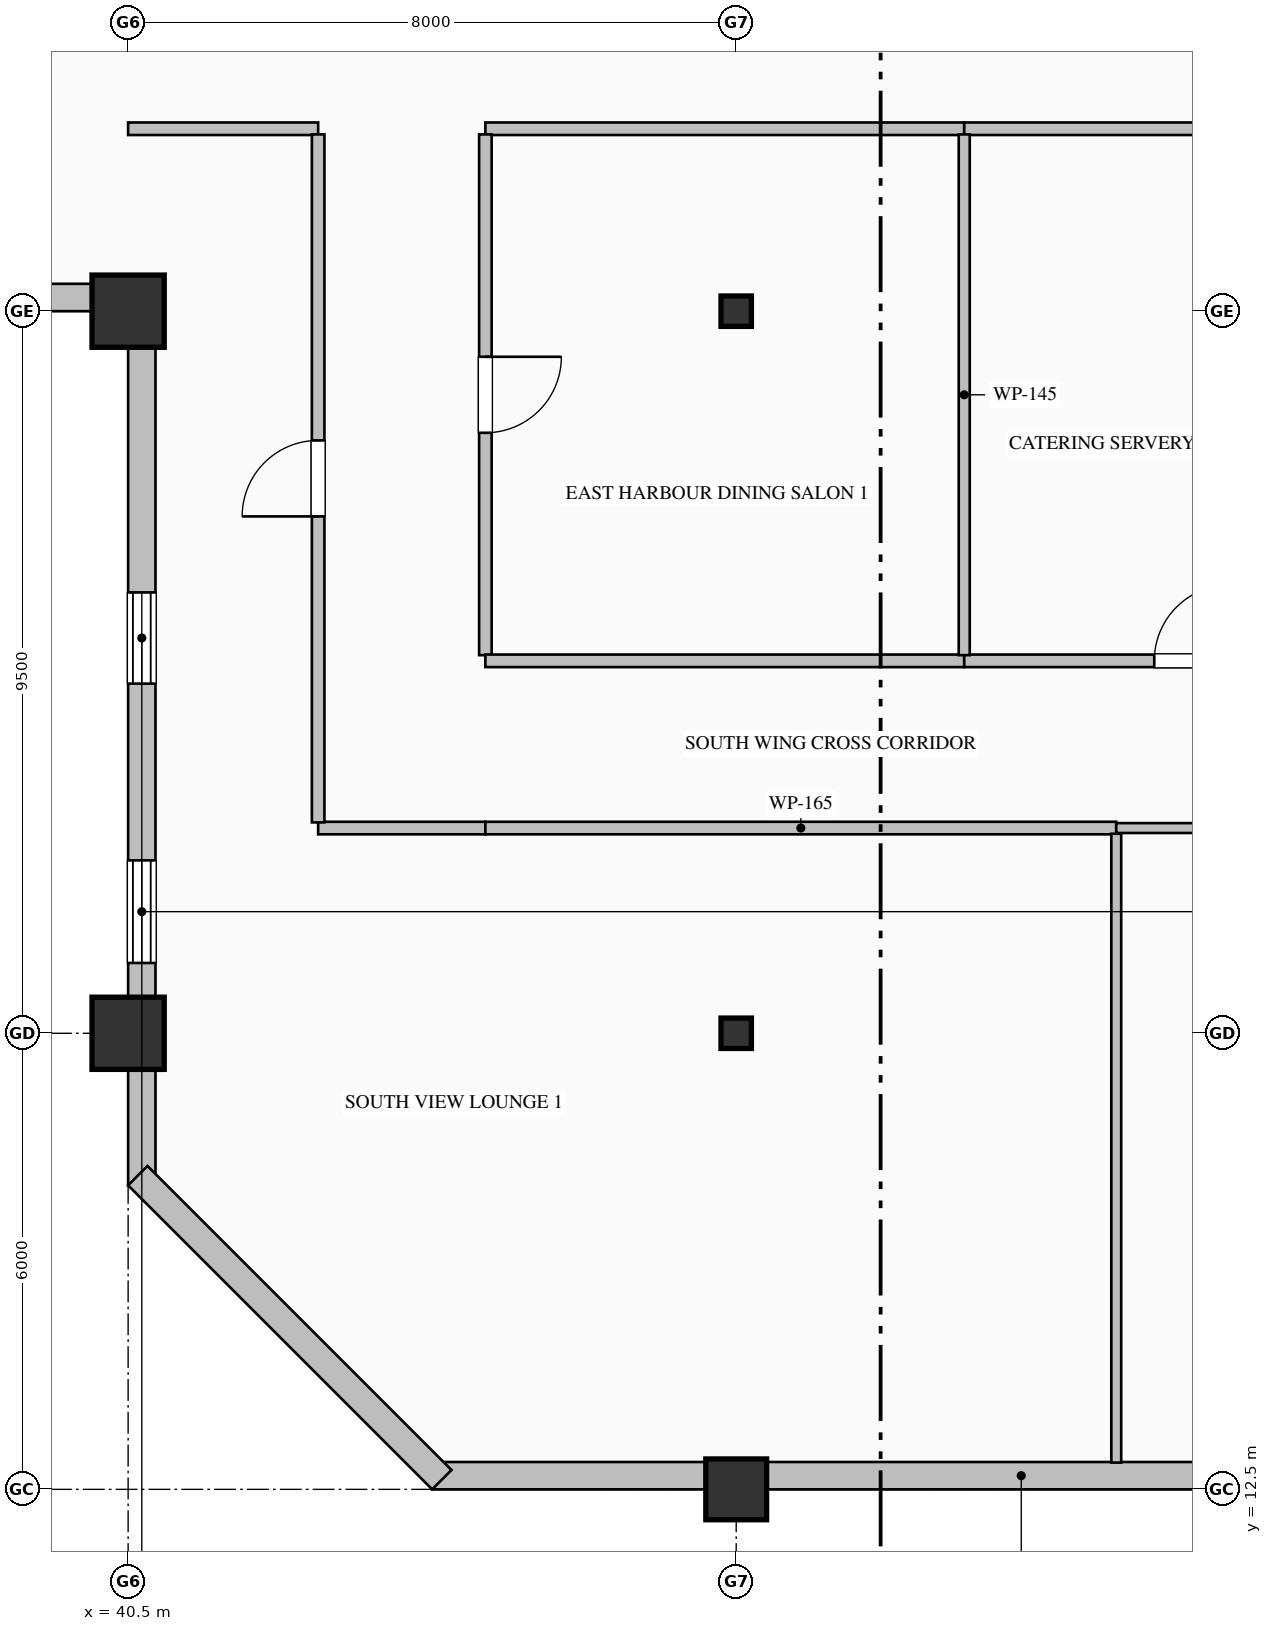
"""IFC4 building model, lengths in metres.
Left out: names, types, materials, properties, quantities, classifications, styles, units other than length and angle.
Written with IfcOpenShell. Run it as: python <this file> out.ifc"""

import sys

from ifc_helpers import new_model, si_unit, direction, frame, frame_2d, origin, origin_2d, place, context, subcontext, project, spatial, rectangle, hollow_rectangle, i_section, extrude, element, fill, save


model = new_model("IFC4")
c1 = context("Model", 3, precision=1e-05, world=origin(), true_north=direction((0.0, 1.0)))
c2 = subcontext(c1, "Body", "Model", "MODEL_VIEW")
j1 = project(units=[si_unit("LENGTHUNIT", "METRE"), si_unit("PLANEANGLEUNIT", "RADIAN")], contexts=[c1])
p1 = place(None, origin())
s1 = spatial("IfcSite", under=j1, at=p1, CompositionType="ELEMENT")
p2 = place(p1, origin())
s2 = spatial("IfcBuilding", under=s1, at=p2, CompositionType="ELEMENT")
p3 = place(p2, frame((0.0, 0.0, 241.8)))
s3 = spatial("IfcBuildingStorey", under=s2, at=p3, CompositionType="ELEMENT", Elevation=241.8)
for number, where, z_axis, x_axis in (
    (1, (40.5, 18.5, 0.0), (0.0, 0.0, 1.0), (1.0, 0.0, 0.0)),
    (2, (40.5, 28.0, 0.0), (0.0, 0.0, 1.0), (1.0, 0.0, 0.0)),
):
    element("IfcColumn", number, at=place(p3, frame(where, z_axis=z_axis, x_axis=x_axis)), inside=s3, PredefinedType="COLUMN", context=c2, shape_type="SweptSolid", body=[
        extrude(hollow_rectangle(XDim=0.95, YDim=0.95, WallThickness=0.036, at=origin_2d()), origin(), (0.0, 0.0, 1.0), 4.0),
    ])
p4 = place(p3, frame((48.5, 12.5, 0.0), z_axis=(0.0, 0.0, 1.0), x_axis=(1.0, 0.0, 0.0)))
e3 = element("IfcColumn", 3, at=p4, inside=s3, PredefinedType="COLUMN", context=c2, shape_type="SweptSolid", body=[
    extrude(hollow_rectangle(XDim=0.8, YDim=0.8, WallThickness=0.032, at=origin_2d()), origin(), (0.0, 0.0, 1.0), 4.0),
])
for number, where, z_axis, x_axis in (
    (4, (48.5, 18.5, 0.0), (0.0, 0.0, 1.0), (1.0, 0.0, 0.0)),
    (5, (48.5, 28.0, 0.0), (0.0, 0.0, 1.0), (1.0, 0.0, 0.0)),
):
    element("IfcColumn", number, at=place(p3, frame(where, z_axis=z_axis, x_axis=x_axis)), inside=s3, PredefinedType="COLUMN", context=c2, shape_type="SweptSolid", body=[
        extrude(i_section(OverallWidth=0.4, OverallDepth=0.4, WebThickness=0.013, FlangeThickness=0.021, FilletRadius=0.022, at=origin_2d()), origin(), (0.0, 0.0, 1.0), 4.0),
    ])
p5 = place(p3, frame((40.68, 16.5, 0.0), z_axis=(0.0, 0.0, 1.0), x_axis=(0.0, 1.0, 0.0)))
e6 = element("IfcWall", 6, at=p5, inside=s3, PredefinedType="SOLIDWALL", context=c2, shape_type="SweptSolid", body=[
    extrude(rectangle(XDim=11.86, YDim=0.36, at=frame_2d((5.93, 0.0))), origin(), (0.0, 0.0, 1.0), 3.187),
])
p6 = place(p5, frame((2.925, 0.0, 0.9)))
e7 = element("IfcOpeningElement", 7, at=p6, cuts=e6, PredefinedType="OPENING", context=c2, shape_type="SweptSolid", body=[
    extrude(rectangle(XDim=1.35, YDim=1.85, at=frame_2d((0.675, 0.925))), frame((0.0, 0.19, 0.0), z_axis=(0.0, -1.0, 0.0), x_axis=(1.0, 0.0, 0.0)), (0.0, 0.0, 1.0), 0.38),
])
p7 = place(p5, frame((6.6, 0.0, 0.7)))
e8 = element("IfcOpeningElement", 8, at=p7, cuts=e6, PredefinedType="OPENING", context=c2, shape_type="SweptSolid", body=[
    extrude(rectangle(XDim=1.2, YDim=1.85, at=frame_2d((0.6, 0.925))), frame((0.0, 0.19, 0.0), z_axis=(0.0, -1.0, 0.0), x_axis=(1.0, 0.0, 0.0)), (0.0, 0.0, 1.0), 0.38),
])
p8 = place(p3, frame((40.52, 28.18, 0.0), z_axis=(0.0, 0.0, 1.0), x_axis=(-1.0, 0.0, 0.0)))
e9 = element("IfcWall", 9, at=p8, inside=s3, PredefinedType="SOLIDWALL", context=c2, shape_type="SweptSolid", body=[
    extrude(rectangle(XDim=27.52, YDim=0.36, at=frame_2d((13.76, 0.0))), origin(), (0.0, 0.0, 1.0), 3.187),
])
p9 = place(p8, frame((10.125, 0.0, 0.9)))
e10 = element("IfcOpeningElement", 10, at=p9, cuts=e9, PredefinedType="OPENING", context=c2, shape_type="SweptSolid", body=[
    extrude(rectangle(XDim=1.35, YDim=1.85, at=frame_2d((0.675, 0.925))), frame((0.0, 0.19, 0.0), z_axis=(0.0, -1.0, 0.0), x_axis=(1.0, 0.0, 0.0)), (0.0, 0.0, 1.0), 0.38),
])
p10 = place(p8, frame((13.8, 0.0, 0.7)))
e11 = element("IfcOpeningElement", 11, at=p10, cuts=e9, PredefinedType="OPENING", context=c2, shape_type="SweptSolid", body=[
    extrude(rectangle(XDim=1.2, YDim=1.85, at=frame_2d((0.6, 0.925))), frame((0.0, 0.19, 0.0), z_axis=(0.0, -1.0, 0.0), x_axis=(1.0, 0.0, 0.0)), (0.0, 0.0, 1.0), 0.38),
])
p11 = place(p8, frame((17.4, 0.0, 0.9)))
e12 = element("IfcOpeningElement", 12, at=p11, cuts=e9, PredefinedType="OPENING", context=c2, shape_type="SweptSolid", body=[
    extrude(rectangle(XDim=1.2, YDim=1.85, at=frame_2d((0.6, 0.925))), frame((0.0, 0.19, 0.0), z_axis=(0.0, -1.0, 0.0), x_axis=(1.0, 0.0, 0.0)), (0.0, 0.0, 1.0), 0.38),
])
p12 = place(p8, frame((20.925, 0.0, 0.9)))
e13 = element("IfcOpeningElement", 13, at=p12, cuts=e9, PredefinedType="OPENING", context=c2, shape_type="SweptSolid", body=[
    extrude(rectangle(XDim=1.35, YDim=1.85, at=frame_2d((0.675, 0.925))), frame((0.0, 0.19, 0.0), z_axis=(0.0, -1.0, 0.0), x_axis=(1.0, 0.0, 0.0)), (0.0, 0.0, 1.0), 0.38),
])
p13 = place(p3, frame((60.0, 12.68, 0.0), z_axis=(0.0, 0.0, 1.0), x_axis=(-1.0, 0.0, 0.0)))
e14 = element("IfcWall", 14, at=p13, inside=s3, PredefinedType="SOLIDWALL", context=c2, shape_type="SweptSolid", body=[
    extrude(rectangle(XDim=15.5, YDim=0.36, at=frame_2d((7.75, 0.0))), origin(), (0.0, 0.0, 1.0), 3.325),
])
p14 = place(p3, frame((44.627, 12.627, 0.0), z_axis=(0.0, 0.0, 1.0), x_axis=(-0.707106781187, 0.707106781187, 0.0)))
e15 = element("IfcWall", 15, at=p14, inside=s3, PredefinedType="SOLIDWALL", context=c2, shape_type="SweptSolid", body=[
    extrude(rectangle(XDim=5.657, YDim=0.36, at=frame_2d((2.828, 0.0))), origin(), (0.0, 0.0, 1.0), 3.775),
])
p15 = place(p3, frame((51.5, 30.4, 0.0), z_axis=(0.0, 0.0, 1.0), x_axis=(-1.0, 0.0, 0.0)))
e16 = element("IfcWall", 16, at=p15, inside=s3, PredefinedType="PARTITIONING", context=c2, shape_type="SweptSolid", body=[
    extrude(rectangle(XDim=6.3, YDim=0.165, at=frame_2d((3.15, 0.0))), origin(), (0.0, 0.0, 1.0), 3.775),
])
p16 = place(p3, frame((56.5, 30.4, 0.0), z_axis=(0.0, 0.0, 1.0), x_axis=(-1.0, 0.0, 0.0)))
e17 = element("IfcWall", 17, at=p16, inside=s3, PredefinedType="PARTITIONING", context=c2, shape_type="SweptSolid", body=[
    extrude(rectangle(XDim=5.0, YDim=0.165, at=frame_2d((2.5, 0.0))), origin(), (0.0, 0.0, 1.0), 3.775),
])
p17 = place(p3, frame((43.0, 30.4, 0.0), z_axis=(0.0, 0.0, 1.0), x_axis=(-1.0, 0.0, 0.0)))
e18 = element("IfcWall", 18, at=p17, inside=s3, PredefinedType="PARTITIONING", context=c2, shape_type="SweptSolid", body=[
    extrude(rectangle(XDim=2.5, YDim=0.165, at=frame_2d((1.25, 0.0))), origin(), (0.0, 0.0, 1.0), 3.775),
])
p18 = place(p3, frame((45.2, 30.325, 0.0), z_axis=(0.0, 0.0, 1.0), x_axis=(0.0, -1.0, 0.0)))
e19 = element("IfcWall", 19, at=p18, inside=s3, PredefinedType="PARTITIONING", context=c2, shape_type="SweptSolid", body=[
    extrude(rectangle(XDim=6.851, YDim=0.165, at=frame_2d((3.425, 0.0))), origin(), (0.0, 0.0, 1.0), 3.775),
])
p19 = place(p18, frame((2.926, 0.0, 0.0)))
e20 = element("IfcOpeningElement", 20, at=p19, cuts=e19, PredefinedType="OPENING", context=c2, shape_type="SweptSolid", body=[
    extrude(rectangle(XDim=1.0, YDim=2.15, at=frame_2d((0.5, 1.075))), frame((0.0, 0.093, 0.0), z_axis=(0.0, -1.0, 0.0), x_axis=(1.0, 0.0, 0.0)), (0.0, 0.0, 1.0), 0.185),
])
p20 = place(p3, frame((45.2, 21.2, 0.0), z_axis=(0.0, 0.0, 1.0), x_axis=(-1.0, 0.0, 0.0)))
e21 = element("IfcWall", 21, at=p20, inside=s3, PredefinedType="PARTITIONING", context=c2, shape_type="SweptSolid", body=[
    extrude(rectangle(XDim=2.2, YDim=0.165, at=frame_2d((1.1, 0.0))), origin(), (0.0, 0.0, 1.0), 3.775),
])
p21 = place(p3, frame((43.0, 21.274, 0.0), z_axis=(0.0, 0.0, 1.0), x_axis=(0.0, 1.0, 0.0)))
e22 = element("IfcWall", 22, at=p21, inside=s3, PredefinedType="PARTITIONING", context=c2, shape_type="SweptSolid", body=[
    extrude(rectangle(XDim=9.051, YDim=0.165, at=frame_2d((4.525, 0.0))), origin(), (0.0, 0.0, 1.0), 3.775),
])
p22 = place(p21, frame((4.025, 0.0, 0.0)))
e23 = element("IfcOpeningElement", 23, at=p22, cuts=e22, PredefinedType="OPENING", context=c2, shape_type="SweptSolid", body=[
    extrude(rectangle(XDim=1.0, YDim=2.15, at=frame_2d((0.5, 1.075))), frame((0.0, 0.093, 0.0), z_axis=(0.0, -1.0, 0.0), x_axis=(1.0, 0.0, 0.0)), (0.0, 0.0, 1.0), 0.185),
])
p23 = place(p3, frame((45.2, 23.4, 0.0), z_axis=(0.0, 0.0, 1.0), x_axis=(1.0, 0.0, 0.0)))
e24 = element("IfcWall", 24, at=p23, inside=s3, PredefinedType="PARTITIONING", context=c2, shape_type="SweptSolid", body=[
    extrude(rectangle(XDim=6.3, YDim=0.165, at=frame_2d((3.15, 0.0))), origin(), (0.0, 0.0, 1.0), 3.467),
])
p24 = place(p3, frame((51.5, 23.4, 0.0), z_axis=(0.0, 0.0, 1.0), x_axis=(1.0, 0.0, 0.0)))
e25 = element("IfcWall", 25, at=p24, inside=s3, PredefinedType="PARTITIONING", context=c2, shape_type="SweptSolid", body=[
    extrude(rectangle(XDim=6.0, YDim=0.165, at=frame_2d((3.0, 0.0))), origin(), (0.0, 0.0, 1.0), 3.467),
])
p25 = place(p24, frame((2.5, 0.0, 0.0)))
e26 = element("IfcOpeningElement", 26, at=p25, cuts=e25, PredefinedType="OPENING", context=c2, shape_type="SweptSolid", body=[
    extrude(rectangle(XDim=1.0, YDim=2.15, at=frame_2d((0.5, 1.075))), frame((0.0, 0.093, 0.0), z_axis=(0.0, -1.0, 0.0), x_axis=(1.0, 0.0, 0.0)), (0.0, 0.0, 1.0), 0.185),
])
p26 = place(p3, frame((53.5, 21.2, 0.0), z_axis=(0.0, 0.0, 1.0), x_axis=(-1.0, 0.0, 0.0)))
e27 = element("IfcWall", 27, at=p26, inside=s3, PredefinedType="PARTITIONING", context=c2, shape_type="SweptSolid", body=[
    extrude(rectangle(XDim=8.3, YDim=0.165, at=frame_2d((4.15, 0.0))), origin(), (0.0, 0.0, 1.0), 3.775),
])
p27 = place(p3, frame((58.0, 21.2, 0.0), z_axis=(0.0, 0.0, 1.0), x_axis=(-1.0, 0.0, 0.0)))
e28 = element("IfcWall", 28, at=p27, inside=s3, PredefinedType="PARTITIONING", context=c2, shape_type="SweptSolid", body=[
    extrude(rectangle(XDim=4.5, YDim=0.13, at=frame_2d((2.25, 0.0))), origin(), (0.0, 0.0, 1.0), 3.775),
])
p28 = place(p27, frame((1.75, 0.0, 0.0)))
e29 = element("IfcOpeningElement", 29, at=p28, cuts=e28, PredefinedType="OPENING", context=c2, shape_type="SweptSolid", body=[
    extrude(rectangle(XDim=1.0, YDim=2.15, at=frame_2d((0.5, 1.075))), frame((0.0, 0.075, 0.0), z_axis=(0.0, -1.0, 0.0), x_axis=(1.0, 0.0, 0.0)), (0.0, 0.0, 1.0), 0.15),
])
p29 = place(p3, frame((51.5, 30.325, 0.0), z_axis=(0.0, 0.0, 1.0), x_axis=(0.0, -1.0, 0.0)))
e30 = element("IfcWall", 30, at=p29, inside=s3, PredefinedType="PARTITIONING", context=c2, shape_type="SweptSolid", body=[
    extrude(rectangle(XDim=6.851, YDim=0.145, at=frame_2d((3.425, 0.0))), origin(), (0.0, 0.0, 1.0), 3.775),
])
p30 = place(p3, frame((53.5, 21.125, 0.0), z_axis=(0.0, 0.0, 1.0), x_axis=(0.0, -1.0, 0.0)))
e31 = element("IfcWall", 31, at=p30, inside=s3, PredefinedType="PARTITIONING", context=c2, shape_type="SweptSolid", body=[
    extrude(rectangle(XDim=8.273, YDim=0.13, at=frame_2d((4.137, 0.0))), origin(), (0.0, 0.0, 1.0), 3.775),
])
p31 = place(p6, origin())
e32 = element("IfcWindow", 32, at=p31, inside=s3, PartitioningType="DOUBLE_PANEL_VERTICAL", PredefinedType="WINDOW", context=c2, shape_type="SweptSolid", body=[
    extrude(rectangle(XDim=1.35, YDim=1.85, at=frame_2d((0.675, 0.925))), frame((0.0, 0.15, 0.0), z_axis=(0.0, -1.0, 0.0), x_axis=(1.0, 0.0, 0.0)), (0.0, 0.0, 1.0), 0.06),
])
fill(e7, e32)
p32 = place(p7, origin())
e33 = element("IfcWindow", 33, at=p32, inside=s3, PartitioningType="DOUBLE_PANEL_VERTICAL", PredefinedType="WINDOW", context=c2, shape_type="SweptSolid", body=[
    extrude(rectangle(XDim=1.2, YDim=1.85, at=frame_2d((0.6, 0.925))), frame((0.0, 0.15, 0.0), z_axis=(0.0, -1.0, 0.0), x_axis=(1.0, 0.0, 0.0)), (0.0, 0.0, 1.0), 0.06),
])
fill(e8, e33)
p33 = place(p19, origin())
e34 = element("IfcDoor", 34, at=p33, inside=s3, OperationType="SINGLE_SWING_LEFT", PredefinedType="DOOR", context=c2, shape_type="SweptSolid", body=[
    extrude(rectangle(XDim=1.0, YDim=2.15, at=frame_2d((0.5, 1.075))), frame((0.0, 0.025, 0.0), z_axis=(0.0, -1.0, 0.0), x_axis=(1.0, 0.0, 0.0)), (0.0, 0.0, 1.0), 0.05),
])
fill(e20, e34)
p34 = place(p25, origin())
e35 = element("IfcDoor", 35, at=p34, inside=s3, OperationType="SINGLE_SWING_RIGHT", PredefinedType="DOOR", context=c2, shape_type="SweptSolid", body=[
    extrude(rectangle(XDim=1.0, YDim=2.15, at=frame_2d((0.5, 1.075))), frame((0.0, 0.025, 0.0), z_axis=(0.0, -1.0, 0.0), x_axis=(1.0, 0.0, 0.0)), (0.0, 0.0, 1.0), 0.05),
])
fill(e26, e35)
p35 = place(p22, origin())
e36 = element("IfcDoor", 36, at=p35, inside=s3, OperationType="SINGLE_SWING_LEFT", PredefinedType="DOOR", context=c2, shape_type="SweptSolid", body=[
    extrude(rectangle(XDim=1.0, YDim=2.15, at=frame_2d((0.5, 1.075))), frame((0.0, 0.025, 0.0), z_axis=(0.0, -1.0, 0.0), x_axis=(1.0, 0.0, 0.0)), (0.0, 0.0, 1.0), 0.05),
])
fill(e23, e36)
save(model, sys.argv[1])
